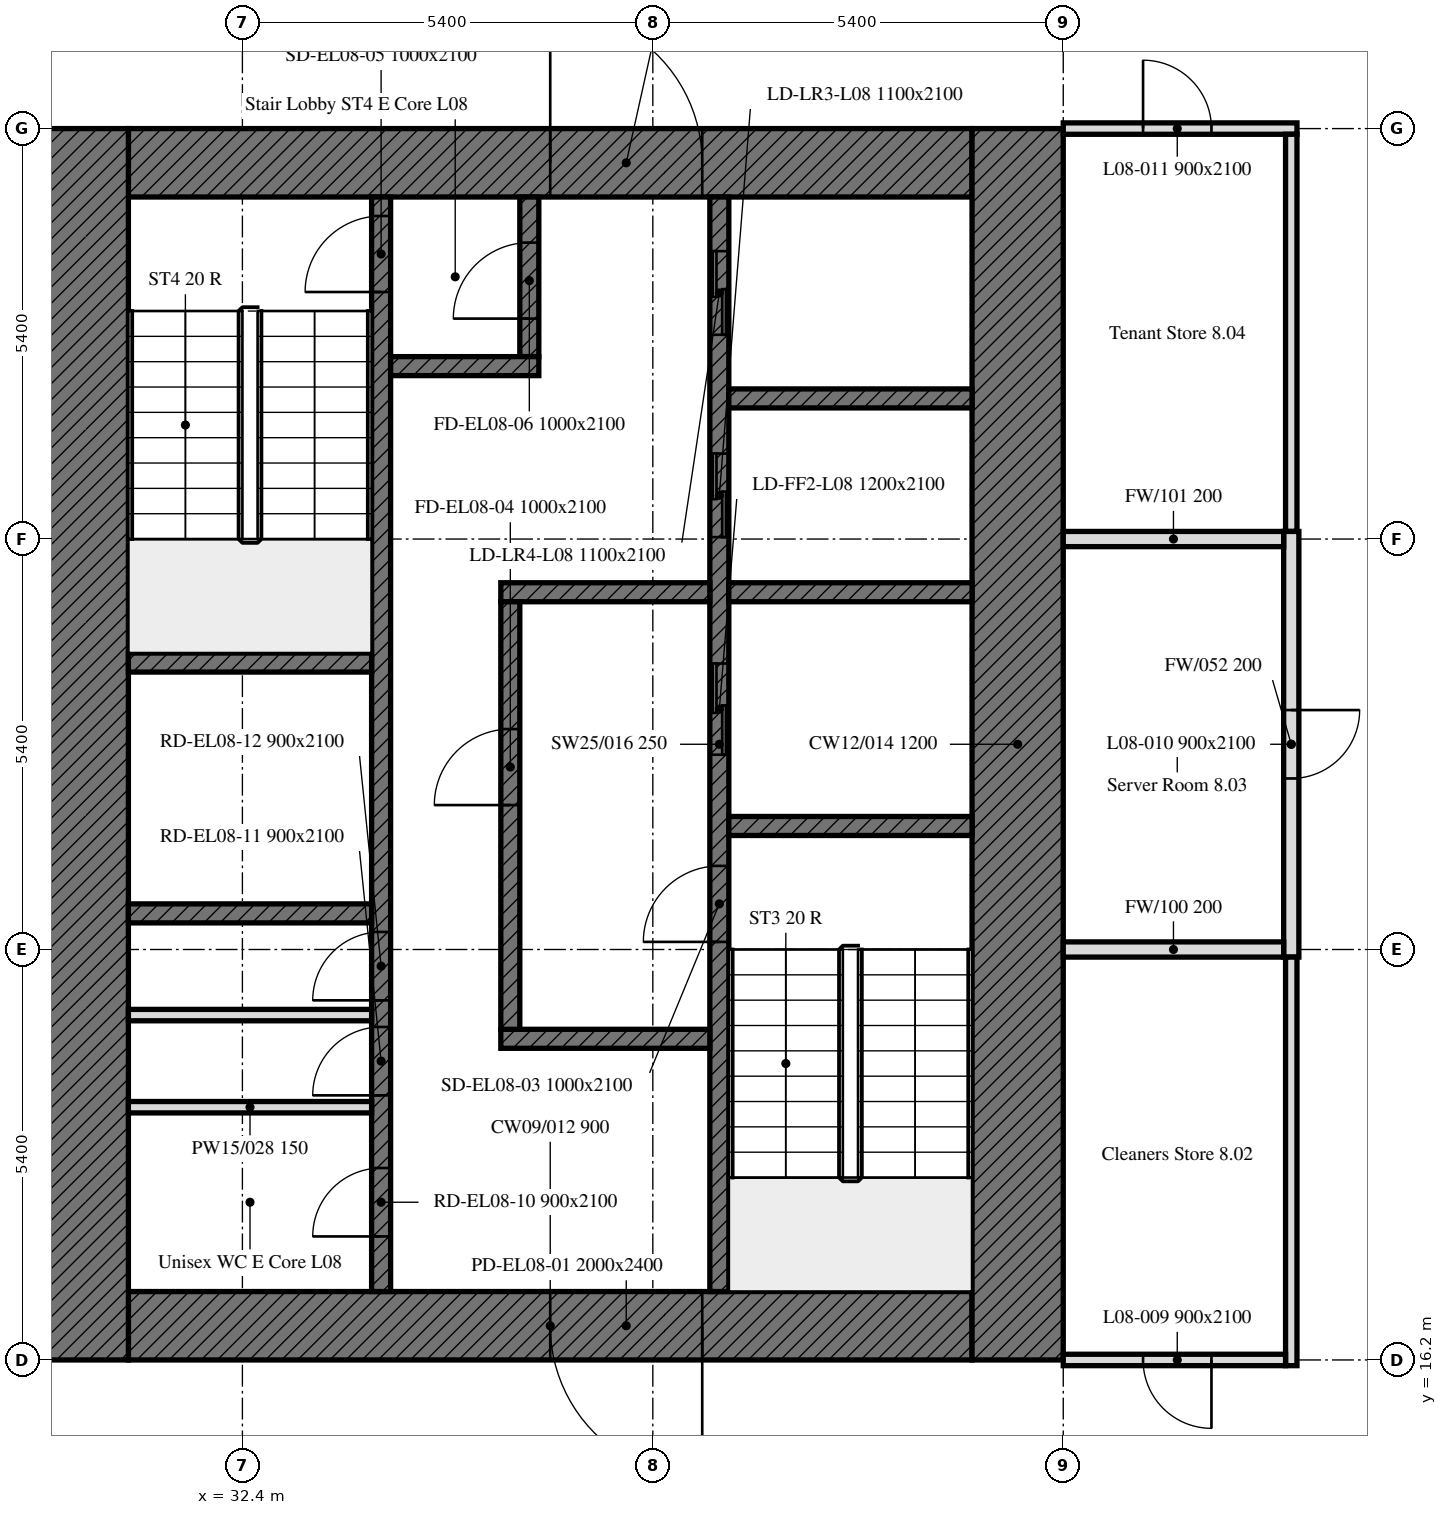
"""IFC4 building model, lengths in metres.
Left out: names, types, materials, properties, quantities, classifications, styles, units other than length and angle.
Written with IfcOpenShell. Run it as: python <this file> out.ifc"""

import sys

from ifc_helpers import new_model, si_unit, direction, frame, frame_2d, origin, place, context, subcontext, project, spatial, rectangle, extrude, element, fill, save


model = new_model("IFC4")
c1 = context("Model", 3, precision=1e-05, world=origin(), true_north=direction((0.0, 1.0)))
c2 = subcontext(c1, "Body", "Model", "MODEL_VIEW")
j1 = project(units=[si_unit("LENGTHUNIT", "METRE"), si_unit("PLANEANGLEUNIT", "RADIAN")], contexts=[c1])
p1 = place(None, origin())
s1 = spatial("IfcSite", under=j1, at=p1, CompositionType="ELEMENT")
p2 = place(p1, origin())
s2 = spatial("IfcBuilding", under=s1, at=p2, CompositionType="ELEMENT")
p3 = place(p2, frame((0.0, 0.0, 41.2)))
s3 = spatial("IfcBuildingStorey", under=s2, at=p3, CompositionType="ELEMENT", Elevation=41.2)
p4 = place(p3, frame((42.0, 16.65, 0.0), z_axis=(0.0, 0.0, 1.0), x_axis=(-1.0, 0.0, 0.0)))
e1 = element("IfcWall", 1, at=p4, inside=s3, PredefinedType="SOLIDWALL", context=c2, shape_type="SweptSolid", body=[
    extrude(rectangle(XDim=11.1, YDim=0.9, at=frame_2d((5.55, 0.0))), origin(), (0.0, 0.0, 1.0), 3.5),
])
p5 = place(p4, frame((3.55, 0.0, 0.0)))
e2 = element("IfcOpeningElement", 2, at=p5, cuts=e1, PredefinedType="OPENING", context=c2, shape_type="SweptSolid", body=[
    extrude(rectangle(XDim=2.0, YDim=2.4, at=frame_2d((1.0, 1.2))), frame((0.0, 0.45, 0.0), z_axis=(0.0, -1.0, 0.0), x_axis=(1.0, 0.0, 0.0)), (0.0, 0.0, 1.0), 0.9),
])
p6 = place(p3, frame((30.9, 31.95, 0.0), z_axis=(0.0, 0.0, 1.0), x_axis=(1.0, 0.0, 0.0)))
e3 = element("IfcWall", 3, at=p6, inside=s3, PredefinedType="SOLIDWALL", context=c2, shape_type="SweptSolid", body=[
    extrude(rectangle(XDim=11.1, YDim=0.9, at=frame_2d((5.55, 0.0))), origin(), (0.0, 0.0, 1.0), 3.5),
])
p7 = place(p6, frame((5.55, 0.0, 0.0)))
e4 = element("IfcOpeningElement", 4, at=p7, cuts=e3, PredefinedType="OPENING", context=c2, shape_type="SweptSolid", body=[
    extrude(rectangle(XDim=2.0, YDim=2.4, at=frame_2d((1.0, 1.2))), frame((0.0, 0.45, 0.0), z_axis=(0.0, -1.0, 0.0), x_axis=(1.0, 0.0, 0.0)), (0.0, 0.0, 1.0), 0.9),
])
for number, where, z_axis, x_axis in (
    (5, (42.6, 32.4, 0.0), (0.0, 0.0, 1.0), (0.0, -1.0, 0.0)),
    (6, (30.3, 16.2, 0.0), (0.0, 0.0, 1.0), (0.0, 1.0, 0.0)),
):
    element("IfcWall", number, at=place(p3, frame(where, z_axis=z_axis, x_axis=x_axis)), inside=s3, PredefinedType="SOLIDWALL", context=c2, shape_type="SweptSolid", body=[
        extrude(rectangle(XDim=16.2, YDim=1.2, at=frame_2d((8.1, 0.0))), origin(), (0.0, 0.0, 1.0), 3.5),
    ])
p8 = place(p3, frame((38.675, 17.1, 0.0), z_axis=(0.0, 0.0, 1.0), x_axis=(0.0, 1.0, 0.0)))
e7 = element("IfcWall", 7, at=p8, inside=s3, PredefinedType="SOLIDWALL", context=c2, shape_type="SweptSolid", body=[
    extrude(rectangle(XDim=14.4, YDim=0.25, at=frame_2d((7.2, 0.0))), origin(), (0.0, 0.0, 1.0), 3.5),
])
p9 = place(p8, frame((4.6, 0.0, 0.0)))
e8 = element("IfcOpeningElement", 8, at=p9, cuts=e7, PredefinedType="OPENING", context=c2, shape_type="SweptSolid", body=[
    extrude(rectangle(XDim=1.0, YDim=2.1, at=frame_2d((0.5, 1.05))), frame((0.0, 0.125, 0.0), z_axis=(0.0, -1.0, 0.0), x_axis=(1.0, 0.0, 0.0)), (0.0, 0.0, 1.0), 0.25),
])
p10 = place(p8, frame((7.062, 0.0, 0.0)))
e9 = element("IfcOpeningElement", 9, at=p10, cuts=e7, PredefinedType="OPENING", context=c2, shape_type="SweptSolid", body=[
    extrude(rectangle(XDim=1.2, YDim=2.1, at=frame_2d((0.6, 1.05))), frame((0.0, 0.125, 0.0), z_axis=(0.0, -1.0, 0.0), x_axis=(1.0, 0.0, 0.0)), (0.0, 0.0, 1.0), 0.25),
])
p11 = place(p8, frame((9.925, 0.0, 0.0)))
e10 = element("IfcOpeningElement", 10, at=p11, cuts=e7, PredefinedType="OPENING", context=c2, shape_type="SweptSolid", body=[
    extrude(rectangle(XDim=1.1, YDim=2.1, at=frame_2d((0.55, 1.05))), frame((0.0, 0.125, 0.0), z_axis=(0.0, -1.0, 0.0), x_axis=(1.0, 0.0, 0.0)), (0.0, 0.0, 1.0), 0.25),
])
p12 = place(p8, frame((12.587, 0.0, 0.0)))
e11 = element("IfcOpeningElement", 11, at=p12, cuts=e7, PredefinedType="OPENING", context=c2, shape_type="SweptSolid", body=[
    extrude(rectangle(XDim=1.1, YDim=2.1, at=frame_2d((0.55, 1.05))), frame((0.0, 0.125, 0.0), z_axis=(0.0, -1.0, 0.0), x_axis=(1.0, 0.0, 0.0)), (0.0, 0.0, 1.0), 0.25),
])
p13 = place(p3, frame((34.225, 17.1, 0.0), z_axis=(0.0, 0.0, 1.0), x_axis=(0.0, 1.0, 0.0)))
e12 = element("IfcWall", 12, at=p13, inside=s3, PredefinedType="SOLIDWALL", context=c2, shape_type="SweptSolid", body=[
    extrude(rectangle(XDim=14.4, YDim=0.25, at=frame_2d((7.2, 0.0))), origin(), (0.0, 0.0, 1.0), 3.5),
])
p14 = place(p13, frame((13.15, 0.0, 0.0)))
e13 = element("IfcOpeningElement", 13, at=p14, cuts=e12, PredefinedType="OPENING", context=c2, shape_type="SweptSolid", body=[
    extrude(rectangle(XDim=1.0, YDim=2.1, at=frame_2d((0.5, 1.05))), frame((0.0, 0.125, 0.0), z_axis=(0.0, -1.0, 0.0), x_axis=(1.0, 0.0, 0.0)), (0.0, 0.0, 1.0), 0.25),
])
p15 = place(p13, frame((0.725, 0.0, 0.0)))
e14 = element("IfcOpeningElement", 14, at=p15, cuts=e12, PredefinedType="OPENING", context=c2, shape_type="SweptSolid", body=[
    extrude(rectangle(XDim=0.9, YDim=2.1, at=frame_2d((0.45, 1.05))), frame((0.0, 0.125, 0.0), z_axis=(0.0, -1.0, 0.0), x_axis=(1.0, 0.0, 0.0)), (0.0, 0.0, 1.0), 0.25),
])
p16 = place(p13, frame((2.581, 0.0, 0.0)))
e15 = element("IfcOpeningElement", 15, at=p16, cuts=e12, PredefinedType="OPENING", context=c2, shape_type="SweptSolid", body=[
    extrude(rectangle(XDim=0.9, YDim=2.1, at=frame_2d((0.45, 1.05))), frame((0.0, 0.125, 0.0), z_axis=(0.0, -1.0, 0.0), x_axis=(1.0, 0.0, 0.0)), (0.0, 0.0, 1.0), 0.25),
])
p17 = place(p13, frame((3.831, 0.0, 0.0)))
e16 = element("IfcOpeningElement", 16, at=p17, cuts=e12, PredefinedType="OPENING", context=c2, shape_type="SweptSolid", body=[
    extrude(rectangle(XDim=0.9, YDim=2.1, at=frame_2d((0.45, 1.05))), frame((0.0, 0.125, 0.0), z_axis=(0.0, -1.0, 0.0), x_axis=(1.0, 0.0, 0.0)), (0.0, 0.0, 1.0), 0.25),
])
p18 = place(p3, frame((38.8, 23.225, 0.0), z_axis=(0.0, 0.0, 1.0), x_axis=(1.0, 0.0, 0.0)))
e17 = element("IfcWall", 17, at=p18, inside=s3, PredefinedType="SOLIDWALL", context=c2, shape_type="SweptSolid", body=[
    extrude(rectangle(XDim=3.2, YDim=0.25, at=frame_2d((1.6, 0.0))), origin(), (0.0, 0.0, 1.0), 3.5),
])
for number, where, z_axis, x_axis in (
    (18, (30.9, 25.375, 0.0), (0.0, 0.0, 1.0), (1.0, 0.0, 0.0)),
    (19, (30.9, 22.075, 0.0), (0.0, 0.0, 1.0), (1.0, 0.0, 0.0)),
):
    element("IfcWall", number, at=place(p3, frame(where, z_axis=z_axis, x_axis=x_axis)), inside=s3, PredefinedType="SOLIDWALL", context=c2, shape_type="SweptSolid", body=[
        extrude(rectangle(XDim=3.2, YDim=0.25, at=frame_2d((1.6, 0.0))), origin(), (0.0, 0.0, 1.0), 3.5),
    ])
p19 = place(p3, frame((38.8, 26.3, 0.0), z_axis=(0.0, 0.0, 1.0), x_axis=(1.0, 0.0, 0.0)))
e20 = element("IfcWall", 20, at=p19, inside=s3, PredefinedType="SOLIDWALL", context=c2, shape_type="SweptSolid", body=[
    extrude(rectangle(XDim=3.2, YDim=0.25, at=frame_2d((1.6, 0.0))), origin(), (0.0, 0.0, 1.0), 3.5),
])
for number, where, z_axis, x_axis in (
    (21, (35.8, 26.3, 0.0), (0.0, 0.0, 1.0), (1.0, 0.0, 0.0)),
    (22, (35.8, 20.425, 0.0), (0.0, 0.0, 1.0), (1.0, 0.0, 0.0)),
):
    element("IfcWall", number, at=place(p3, frame(where, z_axis=z_axis, x_axis=x_axis)), inside=s3, PredefinedType="SOLIDWALL", context=c2, shape_type="SweptSolid", body=[
        extrude(rectangle(XDim=2.75, YDim=0.25, at=frame_2d((1.375, 0.0))), origin(), (0.0, 0.0, 1.0), 3.5),
    ])
p20 = place(p3, frame((36.175, 29.4, 0.0), z_axis=(0.0, 0.0, 1.0), x_axis=(0.0, 1.0, 0.0)))
e23 = element("IfcWall", 23, at=p20, inside=s3, PredefinedType="SOLIDWALL", context=c2, shape_type="SweptSolid", body=[
    extrude(rectangle(XDim=2.1, YDim=0.25, at=frame_2d((1.05, 0.0))), origin(), (0.0, 0.0, 1.0), 3.5),
])
p21 = place(p20, frame((0.5, 0.0, 0.0)))
e24 = element("IfcOpeningElement", 24, at=p21, cuts=e23, PredefinedType="OPENING", context=c2, shape_type="SweptSolid", body=[
    extrude(rectangle(XDim=1.0, YDim=2.1, at=frame_2d((0.5, 1.05))), frame((0.0, 0.125, 0.0), z_axis=(0.0, -1.0, 0.0), x_axis=(1.0, 0.0, 0.0)), (0.0, 0.0, 1.0), 0.25),
])
p22 = place(p3, frame((34.35, 29.275, 0.0), z_axis=(0.0, 0.0, 1.0), x_axis=(1.0, 0.0, 0.0)))
e25 = element("IfcWall", 25, at=p22, inside=s3, PredefinedType="SOLIDWALL", context=c2, shape_type="SweptSolid", body=[
    extrude(rectangle(XDim=1.95, YDim=0.25, at=frame_2d((0.975, 0.0))), origin(), (0.0, 0.0, 1.0), 3.5),
])
p23 = place(p3, frame((35.925, 20.55, 0.0), z_axis=(0.0, 0.0, 1.0), x_axis=(0.0, 1.0, 0.0)))
e26 = element("IfcWall", 26, at=p23, inside=s3, PredefinedType="SOLIDWALL", context=c2, shape_type="SweptSolid", body=[
    extrude(rectangle(XDim=5.625, YDim=0.25, at=frame_2d((2.812, 0.0))), origin(), (0.0, 0.0, 1.0), 3.5),
])
p24 = place(p23, frame((2.95, 0.0, 0.0)))
e27 = element("IfcOpeningElement", 27, at=p24, cuts=e26, PredefinedType="OPENING", context=c2, shape_type="SweptSolid", body=[
    extrude(rectangle(XDim=1.0, YDim=2.1, at=frame_2d((0.5, 1.05))), frame((0.0, 0.125, 0.0), z_axis=(0.0, -1.0, 0.0), x_axis=(1.0, 0.0, 0.0)), (0.0, 0.0, 1.0), 0.25),
])
p25 = place(p3, frame((38.8, 28.85, 0.0), z_axis=(0.0, 0.0, 1.0), x_axis=(1.0, 0.0, 0.0)))
e28 = element("IfcWall", 28, at=p25, inside=s3, PredefinedType="SOLIDWALL", context=c2, shape_type="SweptSolid", body=[
    extrude(rectangle(XDim=3.2, YDim=0.25, at=frame_2d((1.6, 0.0))), origin(), (0.0, 0.0, 1.0), 3.5),
])
for number, where, z_axis, x_axis in (
    (29, (30.9, 19.525, 0.0), (0.0, 0.0, 1.0), (1.0, 0.0, 0.0)),
    (30, (30.9, 20.737, 0.0), (0.0, 0.0, 1.0), (1.0, 0.0, 0.0)),
):
    element("IfcWall", number, at=place(p3, frame(where, z_axis=z_axis, x_axis=x_axis)), inside=s3, PredefinedType="PARTITIONING", context=c2, shape_type="SweptSolid", body=[
        extrude(rectangle(XDim=3.2, YDim=0.15, at=frame_2d((1.6, 0.0))), origin(), (0.0, 0.0, 1.0), 3.5),
    ])
p26 = place(p3, frame((43.2, 32.4, 0.0), z_axis=(0.0, 0.0, 1.0), x_axis=(1.0, 0.0, 0.0)))
e31 = element("IfcWall", 31, at=p26, inside=s3, PredefinedType="PARTITIONING", context=c2, shape_type="SweptSolid", body=[
    extrude(rectangle(XDim=3.075, YDim=0.15, at=frame_2d((1.538, 0.0))), origin(), (0.0, 0.0, 1.0), 2.75),
])
p27 = place(p26, frame((1.05, 0.0, 0.0)))
e32 = element("IfcOpeningElement", 32, at=p27, cuts=e31, PredefinedType="OPENING", context=c2, shape_type="SweptSolid", body=[
    extrude(rectangle(XDim=0.9, YDim=2.1, at=frame_2d((0.45, 1.05))), frame((0.0, 0.075, 0.0), z_axis=(0.0, -1.0, 0.0), x_axis=(1.0, 0.0, 0.0)), (0.0, 0.0, 1.0), 0.15),
])
p28 = place(p3, frame((46.2, 32.325, 0.0), z_axis=(0.0, 0.0, 1.0), x_axis=(0.0, -1.0, 0.0)))
e33 = element("IfcWall", 33, at=p28, inside=s3, PredefinedType="PARTITIONING", context=c2, shape_type="SweptSolid", body=[
    extrude(rectangle(XDim=5.225, YDim=0.15, at=frame_2d((2.612, 0.0))), origin(), (0.0, 0.0, 1.0), 3.5),
])
p29 = place(p3, frame((46.2, 27.1, 0.0), z_axis=(0.0, 0.0, 1.0), x_axis=(0.0, -1.0, 0.0)))
e34 = element("IfcWall", 34, at=p29, inside=s3, PredefinedType="PARTITIONING", context=c2, shape_type="SweptSolid", body=[
    extrude(rectangle(XDim=5.6, YDim=0.2, at=frame_2d((2.8, 0.0))), origin(), (0.0, 0.0, 1.0), 3.5),
])
p30 = place(p29, frame((2.35, 0.0, 0.0)))
e35 = element("IfcOpeningElement", 35, at=p30, cuts=e34, PredefinedType="OPENING", context=c2, shape_type="SweptSolid", body=[
    extrude(rectangle(XDim=0.9, YDim=2.1, at=frame_2d((0.45, 1.05))), frame((0.0, 0.1, 0.0), z_axis=(0.0, -1.0, 0.0), x_axis=(1.0, 0.0, 0.0)), (0.0, 0.0, 1.0), 0.2),
])
p31 = place(p3, frame((46.2, 21.5, 0.0), z_axis=(0.0, 0.0, 1.0), x_axis=(0.0, -1.0, 0.0)))
e36 = element("IfcWall", 36, at=p31, inside=s3, PredefinedType="PARTITIONING", context=c2, shape_type="SweptSolid", body=[
    extrude(rectangle(XDim=5.375, YDim=0.15, at=frame_2d((2.688, 0.0))), origin(), (0.0, 0.0, 1.0), 3.5),
])
p32 = place(p3, frame((46.125, 16.2, 0.0), z_axis=(0.0, 0.0, 1.0), x_axis=(-1.0, 0.0, 0.0)))
e37 = element("IfcWall", 37, at=p32, inside=s3, PredefinedType="PARTITIONING", context=c2, shape_type="SweptSolid", body=[
    extrude(rectangle(XDim=2.925, YDim=0.15, at=frame_2d((1.462, 0.0))), origin(), (0.0, 0.0, 1.0), 2.75),
])
p33 = place(p32, frame((0.975, 0.0, 0.0)))
e38 = element("IfcOpeningElement", 38, at=p33, cuts=e37, PredefinedType="OPENING", context=c2, shape_type="SweptSolid", body=[
    extrude(rectangle(XDim=0.9, YDim=2.1, at=frame_2d((0.45, 1.05))), frame((0.0, 0.075, 0.0), z_axis=(0.0, -1.0, 0.0), x_axis=(1.0, 0.0, 0.0)), (0.0, 0.0, 1.0), 0.15),
])
for number, where, z_axis, x_axis in (
    (39, (46.1, 21.6, 0.0), (0.0, 0.0, 1.0), (-1.0, 0.0, 0.0)),
    (40, (46.1, 27.0, 0.0), (0.0, 0.0, 1.0), (-1.0, 0.0, 0.0)),
):
    element("IfcWall", number, at=place(p3, frame(where, z_axis=z_axis, x_axis=x_axis)), inside=s3, PredefinedType="PARTITIONING", context=c2, shape_type="SweptSolid", body=[
        extrude(rectangle(XDim=2.9, YDim=0.2, at=frame_2d((1.45, 0.0))), origin(), (0.0, 0.0, 1.0), 2.75),
    ])
p34 = place(p5, origin())
e41 = element("IfcDoor", 41, at=p34, inside=s3, OperationType="DOUBLE_DOOR_SINGLE_SWING", PredefinedType="DOOR", context=c2, shape_type="SweptSolid", body=[
    extrude(rectangle(XDim=2.0, YDim=2.4, at=frame_2d((1.0, 1.2))), frame((0.0, 0.025, 0.0), z_axis=(0.0, -1.0, 0.0), x_axis=(1.0, 0.0, 0.0)), (0.0, 0.0, 1.0), 0.05),
])
fill(e2, e41)
p35 = place(p7, origin())
e42 = element("IfcDoor", 42, at=p35, inside=s3, OperationType="DOUBLE_DOOR_SINGLE_SWING", PredefinedType="DOOR", context=c2, shape_type="SweptSolid", body=[
    extrude(rectangle(XDim=2.0, YDim=2.4, at=frame_2d((1.0, 1.2))), frame((0.0, 0.025, 0.0), z_axis=(0.0, -1.0, 0.0), x_axis=(1.0, 0.0, 0.0)), (0.0, 0.0, 1.0), 0.05),
])
fill(e4, e42)
p36 = place(p9, origin())
e43 = element("IfcDoor", 43, at=p36, inside=s3, OperationType="SINGLE_SWING_LEFT", PredefinedType="DOOR", context=c2, shape_type="SweptSolid", body=[
    extrude(rectangle(XDim=1.0, YDim=2.1, at=frame_2d((0.5, 1.05))), frame((0.0, 0.025, 0.0), z_axis=(0.0, -1.0, 0.0), x_axis=(1.0, 0.0, 0.0)), (0.0, 0.0, 1.0), 0.05),
])
fill(e8, e43)
p37 = place(p24, origin())
e44 = element("IfcDoor", 44, at=p37, inside=s3, OperationType="SINGLE_SWING_LEFT", PredefinedType="DOOR", context=c2, shape_type="SweptSolid", body=[
    extrude(rectangle(XDim=1.0, YDim=2.1, at=frame_2d((0.5, 1.05))), frame((0.0, 0.025, 0.0), z_axis=(0.0, -1.0, 0.0), x_axis=(1.0, 0.0, 0.0)), (0.0, 0.0, 1.0), 0.05),
])
fill(e27, e44)
p38 = place(p14, origin())
e45 = element("IfcDoor", 45, at=p38, inside=s3, OperationType="SINGLE_SWING_LEFT", PredefinedType="DOOR", context=c2, shape_type="SweptSolid", body=[
    extrude(rectangle(XDim=1.0, YDim=2.1, at=frame_2d((0.5, 1.05))), frame((0.0, 0.025, 0.0), z_axis=(0.0, -1.0, 0.0), x_axis=(1.0, 0.0, 0.0)), (0.0, 0.0, 1.0), 0.05),
])
fill(e13, e45)
p39 = place(p21, origin())
e46 = element("IfcDoor", 46, at=p39, inside=s3, OperationType="SINGLE_SWING_LEFT", PredefinedType="DOOR", context=c2, shape_type="SweptSolid", body=[
    extrude(rectangle(XDim=1.0, YDim=2.1, at=frame_2d((0.5, 1.05))), frame((0.0, 0.025, 0.0), z_axis=(0.0, -1.0, 0.0), x_axis=(1.0, 0.0, 0.0)), (0.0, 0.0, 1.0), 0.05),
])
fill(e24, e46)
p40 = place(p10, origin())
e47 = element("IfcDoor", 47, at=p40, inside=s3, OperationType="DOUBLE_DOOR_SLIDING", PredefinedType="DOOR", context=c2, shape_type="SweptSolid", body=[
    extrude(rectangle(XDim=1.2, YDim=2.1, at=frame_2d((0.6, 1.05))), frame((0.0, 0.025, 0.0), z_axis=(0.0, -1.0, 0.0), x_axis=(1.0, 0.0, 0.0)), (0.0, 0.0, 1.0), 0.05),
])
fill(e9, e47)
p41 = place(p11, origin())
e48 = element("IfcDoor", 48, at=p41, inside=s3, OperationType="DOUBLE_DOOR_SLIDING", PredefinedType="DOOR", context=c2, shape_type="SweptSolid", body=[
    extrude(rectangle(XDim=1.1, YDim=2.1, at=frame_2d((0.55, 1.05))), frame((0.0, 0.025, 0.0), z_axis=(0.0, -1.0, 0.0), x_axis=(1.0, 0.0, 0.0)), (0.0, 0.0, 1.0), 0.05),
])
fill(e10, e48)
p42 = place(p12, origin())
e49 = element("IfcDoor", 49, at=p42, inside=s3, OperationType="DOUBLE_DOOR_SLIDING", PredefinedType="DOOR", context=c2, shape_type="SweptSolid", body=[
    extrude(rectangle(XDim=1.1, YDim=2.1, at=frame_2d((0.55, 1.05))), frame((0.0, 0.025, 0.0), z_axis=(0.0, -1.0, 0.0), x_axis=(1.0, 0.0, 0.0)), (0.0, 0.0, 1.0), 0.05),
])
fill(e11, e49)
p43 = place(p15, origin())
e50 = element("IfcDoor", 50, at=p43, inside=s3, OperationType="SINGLE_SWING_LEFT", PredefinedType="DOOR", context=c2, shape_type="SweptSolid", body=[
    extrude(rectangle(XDim=0.9, YDim=2.1, at=frame_2d((0.45, 1.05))), frame((0.0, 0.025, 0.0), z_axis=(0.0, -1.0, 0.0), x_axis=(1.0, 0.0, 0.0)), (0.0, 0.0, 1.0), 0.05),
])
fill(e14, e50)
p44 = place(p16, origin())
e51 = element("IfcDoor", 51, at=p44, inside=s3, OperationType="SINGLE_SWING_LEFT", PredefinedType="DOOR", context=c2, shape_type="SweptSolid", body=[
    extrude(rectangle(XDim=0.9, YDim=2.1, at=frame_2d((0.45, 1.05))), frame((0.0, 0.025, 0.0), z_axis=(0.0, -1.0, 0.0), x_axis=(1.0, 0.0, 0.0)), (0.0, 0.0, 1.0), 0.05),
])
fill(e15, e51)
p45 = place(p17, origin())
e52 = element("IfcDoor", 52, at=p45, inside=s3, OperationType="SINGLE_SWING_LEFT", PredefinedType="DOOR", context=c2, shape_type="SweptSolid", body=[
    extrude(rectangle(XDim=0.9, YDim=2.1, at=frame_2d((0.45, 1.05))), frame((0.0, 0.025, 0.0), z_axis=(0.0, -1.0, 0.0), x_axis=(1.0, 0.0, 0.0)), (0.0, 0.0, 1.0), 0.05),
])
fill(e16, e52)
p46 = place(p33, origin())
e53 = element("IfcDoor", 53, at=p46, inside=s3, OperationType="SINGLE_SWING_RIGHT", PredefinedType="DOOR", context=c2, shape_type="SweptSolid", body=[
    extrude(rectangle(XDim=0.9, YDim=2.1, at=frame_2d((0.45, 1.05))), frame((0.0, 0.025, 0.0), z_axis=(0.0, -1.0, 0.0), x_axis=(1.0, 0.0, 0.0)), (0.0, 0.0, 1.0), 0.05),
])
fill(e38, e53)
p47 = place(p30, origin())
e54 = element("IfcDoor", 54, at=p47, inside=s3, OperationType="SINGLE_SWING_RIGHT", PredefinedType="DOOR", context=c2, shape_type="SweptSolid", body=[
    extrude(rectangle(XDim=0.9, YDim=2.1, at=frame_2d((0.45, 1.05))), frame((0.0, 0.025, 0.0), z_axis=(0.0, -1.0, 0.0), x_axis=(1.0, 0.0, 0.0)), (0.0, 0.0, 1.0), 0.05),
])
fill(e35, e54)
p48 = place(p27, origin())
e55 = element("IfcDoor", 55, at=p48, inside=s3, OperationType="SINGLE_SWING_RIGHT", PredefinedType="DOOR", context=c2, shape_type="SweptSolid", body=[
    extrude(rectangle(XDim=0.9, YDim=2.1, at=frame_2d((0.45, 1.05))), frame((0.0, 0.025, 0.0), z_axis=(0.0, -1.0, 0.0), x_axis=(1.0, 0.0, 0.0)), (0.0, 0.0, 1.0), 0.05),
])
fill(e32, e55)
save(model, sys.argv[1])
